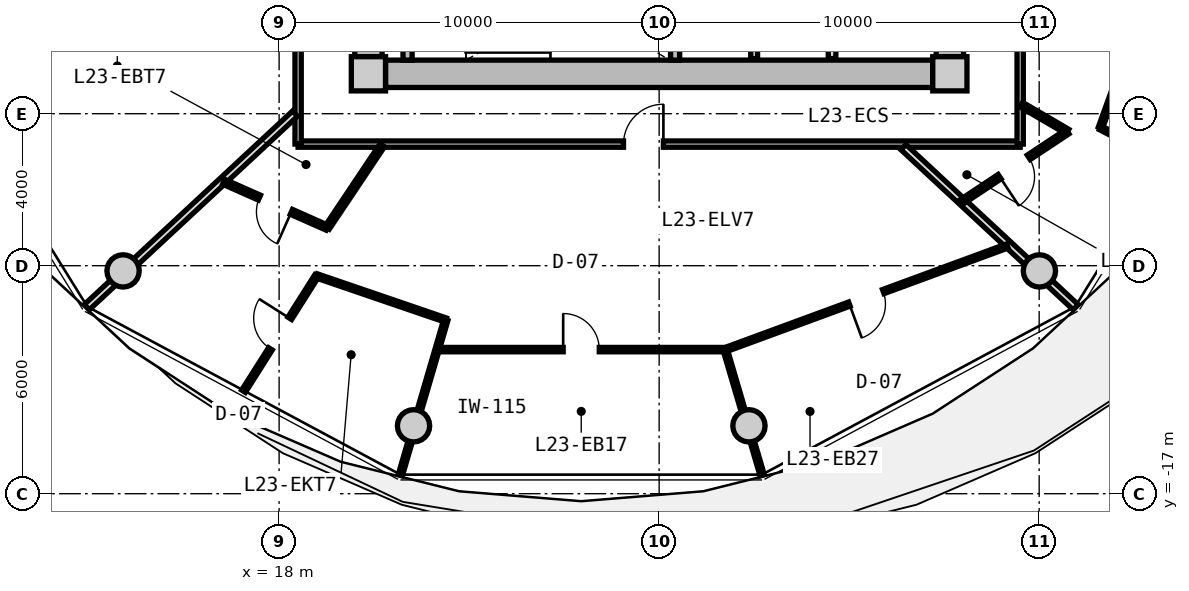
"""IFC4 building model, lengths in metres.
Left out: names, types, materials, properties, quantities, classifications, styles, units other than length and angle.
Written with IfcOpenShell. Run it as: python <this file> out.ifc"""

import sys

from ifc_helpers import new_model, si_unit, direction, frame, frame_2d, origin, origin_2d, place, context, subcontext, project, spatial, rectangle, circle, extrude, source, transform, mapped, element, fill, save


model = new_model("IFC4")
c1 = context("Model", 3, precision=1e-05, world=origin(), true_north=direction((0.0, 1.0)))
c2 = subcontext(c1, "Body", "Model", "MODEL_VIEW")
j1 = project(units=[si_unit("LENGTHUNIT", "METRE"), si_unit("PLANEANGLEUNIT", "RADIAN")], contexts=[c1])
p1 = place(None, origin())
s1 = spatial("IfcSite", under=j1, at=p1, CompositionType="ELEMENT")
p2 = place(p1, origin())
s2 = spatial("IfcBuilding", under=s1, at=p2, CompositionType="ELEMENT")
p3 = place(p2, frame((0.0, 0.0, 77.95)))
s3 = spatial("IfcBuildingStorey", under=s2, at=p3, CompositionType="ELEMENT", Elevation=77.95)
m1 = source(origin(), c2, "Body", "SweptSolid", [
    extrude(rectangle(XDim=0.9, YDim=0.9, at=origin_2d()), origin(), (0.0, 0.0, 1.0), 3.05),
])
for number, where, z_axis, x_axis in (
    (1, (20.35, -5.95, 0.0), (0.0, 0.0, 1.0), (1.0, 0.0, 0.0)),
    (2, (35.65, -5.95, 0.0), (0.0, 0.0, 1.0), (1.0, 0.0, 0.0)),
):
    element("IfcColumn", number, at=place(p3, frame(where, z_axis=z_axis, x_axis=x_axis)), inside=s3, PredefinedType="COLUMN", context=c2, shape_type="MappedRepresentation", body=[
        mapped(m1, transform((0.0, 0.0, 0.0), x_axis=(1.0, 0.0, 0.0), y_axis=(0.0, 1.0, 0.0), z_axis=(0.0, 0.0, 1.0), scale=1.0)),
    ])
m2 = source(origin(), c2, "Body", "SweptSolid", [
    extrude(rectangle(XDim=14.4, YDim=0.72, at=frame_2d((7.2, 0.0))), origin(), (0.0, 0.0, 1.0), 2.79),
])
p4 = place(p3, frame((35.2, -5.95, 0.0), z_axis=(0.0, 0.0, 1.0), x_axis=(-1.0, 0.0, 0.0)))
e3 = element("IfcWall", 3, at=p4, inside=s3, PredefinedType="SHEAR", context=c2, shape_type="MappedRepresentation", body=[
    mapped(m2, transform((0.0, 0.0, 0.0), x_axis=(1.0, 0.0, 0.0), y_axis=(0.0, 1.0, 0.0), z_axis=(0.0, 0.0, 1.0), scale=1.0)),
])
m3 = source(origin(), c2, "Body", "SweptSolid", [
    extrude(rectangle(XDim=11.0, YDim=0.72, at=frame_2d((5.5, 0.0))), origin(), (0.0, 0.0, 1.0), 2.79),
])
p5 = place(p3, frame((20.35, -5.5, 0.0), z_axis=(0.0, 0.0, 1.0), x_axis=(0.0, 1.0, 0.0)))
e4 = element("IfcWall", 4, at=p5, inside=s3, PredefinedType="SHEAR", context=c2, shape_type="MappedRepresentation", body=[
    mapped(m3, transform((0.0, 0.0, 0.0), x_axis=(1.0, 0.0, 0.0), y_axis=(0.0, 1.0, 0.0), z_axis=(0.0, 0.0, 1.0), scale=1.0)),
])
p6 = place(p5, frame((3.8, 0.0, 0.0)))
e5 = element("IfcOpeningElement", 5, at=p6, cuts=e4, PredefinedType="OPENING", context=c2, shape_type="SweptSolid", body=[
    extrude(rectangle(XDim=1.2, YDim=2.15, at=frame_2d((0.6, 1.075))), frame((0.0, 0.37, 0.0), z_axis=(0.0, -1.0, 0.0), x_axis=(1.0, 0.0, 0.0)), (0.0, 0.0, 1.0), 0.74),
])
p7 = place(p3, frame((35.65, 5.5, 0.0), z_axis=(0.0, 0.0, 1.0), x_axis=(0.0, -1.0, 0.0)))
e6 = element("IfcWall", 6, at=p7, inside=s3, PredefinedType="SHEAR", context=c2, shape_type="MappedRepresentation", body=[
    mapped(m3, transform((0.0, 0.0, 0.0), x_axis=(1.0, 0.0, 0.0), y_axis=(0.0, 1.0, 0.0), z_axis=(0.0, 0.0, 1.0), scale=1.0)),
])
p8 = place(p7, frame((5.65, 0.0, 0.0)))
e7 = element("IfcOpeningElement", 7, at=p8, cuts=e6, PredefinedType="OPENING", context=c2, shape_type="SweptSolid", body=[
    extrude(rectangle(XDim=1.2, YDim=2.15, at=frame_2d((0.6, 1.075))), frame((0.0, 0.37, 0.0), z_axis=(0.0, -1.0, 0.0), x_axis=(1.0, 0.0, 0.0)), (0.0, 0.0, 1.0), 0.74),
])
p9 = place(p7, frame((9.3, 0.0, 0.0)))
e8 = element("IfcOpeningElement", 8, at=p9, cuts=e6, PredefinedType="OPENING", context=c2, shape_type="SweptSolid", body=[
    extrude(rectangle(XDim=1.0, YDim=2.1, at=frame_2d((0.5, 1.05))), frame((0.0, 0.37, 0.0), z_axis=(0.0, -1.0, 0.0), x_axis=(1.0, 0.0, 0.0)), (0.0, 0.0, 1.0), 0.74),
])
m4 = source(origin(), c2, "Body", "SweptSolid", [
    extrude(circle(Radius=0.425, at=origin_2d()), origin(), (0.0, 0.0, 1.0), 3.47),
])
for number, where, z_axis, x_axis in (
    (9, (13.894, -11.137, -0.42), (0.0, 0.0, 1.0), (1.0, 0.0, 0.0)),
    (10, (21.537, -15.213, -0.42), (0.0, 0.0, 1.0), (1.0, 0.0, 0.0)),
    (11, (30.363, -15.213, -0.42), (0.0, 0.0, 1.0), (1.0, 0.0, 0.0)),
    (12, (38.006, -11.137, -0.42), (0.0, 0.0, 1.0), (1.0, 0.0, 0.0)),
):
    element("IfcColumn", number, at=place(p3, frame(where, z_axis=z_axis, x_axis=x_axis)), inside=s3, PredefinedType="COLUMN", context=c2, shape_type="MappedRepresentation", body=[
        mapped(m4, transform((0.0, 0.0, 0.0), x_axis=(1.0, 0.0, 0.0), y_axis=(0.0, 1.0, 0.0), z_axis=(0.0, 0.0, 1.0), scale=1.0)),
    ])
m5 = source(origin(), c2, "Body", "SweptSolid", [
    extrude(rectangle(XDim=3.14, YDim=0.24, at=frame_2d((1.57, 0.0))), origin(), (0.0, 0.0, 1.0), 2.79),
])
for number, where, z_axis, x_axis in (
    (13, (21.38, -5.59, 0.0), (0.0, 0.0, 1.0), (0.0, 1.0, 0.0)),
    (14, (28.42, -5.59, 0.0), (0.0, 0.0, 1.0), (0.0, 1.0, 0.0)),
):
    element("IfcWall", number, at=place(p3, frame(where, z_axis=z_axis, x_axis=x_axis)), inside=s3, PredefinedType="PARTITIONING", context=c2, shape_type="MappedRepresentation", body=[
        mapped(m5, transform((0.0, 0.0, 0.0), x_axis=(1.0, 0.0, 0.0), y_axis=(0.0, 1.0, 0.0), z_axis=(0.0, 0.0, 1.0), scale=1.0)),
    ])
m6 = source(origin(), c2, "Body", "SweptSolid", [
    extrude(rectangle(XDim=3.8, YDim=0.2, at=frame_2d((1.9, 0.0))), origin(), (0.0, 0.0, 1.0), 2.775),
])
p10 = place(p3, frame((32.55, -5.55, 0.0), z_axis=(0.0, 0.0, 1.0), x_axis=(0.0, 1.0, 0.0)))
e15 = element("IfcWall", 15, at=p10, inside=s3, PredefinedType="PARTITIONING", context=c2, shape_type="MappedRepresentation", body=[
    mapped(m6, transform((0.0, 0.0, 0.0), x_axis=(1.0, 0.0, 0.0), y_axis=(0.0, 1.0, 0.0), z_axis=(0.0, 0.0, 1.0), scale=1.0)),
])
m7 = source(origin(), c2, "Body", "SweptSolid", [
    extrude(rectangle(XDim=3.22, YDim=0.18, at=frame_2d((1.61, 0.0))), origin(), (0.0, 0.0, 1.0), 2.775),
])
p11 = place(p3, frame((30.5, -5.55, 0.0), z_axis=(0.0, 0.0, 1.0), x_axis=(0.0, 1.0, 0.0)))
e16 = element("IfcWall", 16, at=p11, inside=s3, PredefinedType="PARTITIONING", context=c2, shape_type="MappedRepresentation", body=[
    mapped(m7, transform((0.0, 0.0, 0.0), x_axis=(1.0, 0.0, 0.0), y_axis=(0.0, 1.0, 0.0), z_axis=(0.0, 0.0, 1.0), scale=1.0)),
])
m8 = source(origin(), c2, "Body", "SweptSolid", [
    extrude(rectangle(XDim=19.0, YDim=0.165, at=frame_2d((9.5, 0.0))), origin(), (0.0, 0.0, 1.0), 2.775),
])
p12 = place(p3, frame((37.5, -7.8, 0.0), z_axis=(0.0, 0.0, 1.0), x_axis=(-1.0, 0.0, 0.0)))
e17 = element("IfcWall", 17, at=p12, inside=s3, PredefinedType="PARTITIONING", context=c2, shape_type="MappedRepresentation", body=[
    mapped(m8, transform((0.0, 0.0, 0.0), x_axis=(1.0, 0.0, 0.0), y_axis=(0.0, 1.0, 0.0), z_axis=(0.0, 0.0, 1.0), scale=1.0)),
])
p13 = place(p12, frame((9.388, 0.0, 0.0)))
e18 = element("IfcOpeningElement", 18, at=p13, cuts=e17, PredefinedType="OPENING", context=c2, shape_type="SweptSolid", body=[
    extrude(rectangle(XDim=1.05, YDim=2.15, at=frame_2d((0.525, 1.075))), frame((0.0, 0.093, 0.0), z_axis=(0.0, -1.0, 0.0), x_axis=(1.0, 0.0, 0.0)), (0.0, 0.0, 1.0), 0.185),
])
m9 = source(origin(), c2, "Body", "SweptSolid", [
    extrude(rectangle(XDim=15.6, YDim=0.165, at=frame_2d((7.8, 0.0))), origin(), (0.0, 0.0, 1.0), 2.775),
])
p14 = place(p3, frame((18.5, -7.8, 0.0), z_axis=(0.0, 0.0, 1.0), x_axis=(0.0, 1.0, 0.0)))
e19 = element("IfcWall", 19, at=p14, inside=s3, PredefinedType="PARTITIONING", context=c2, shape_type="MappedRepresentation", body=[
    mapped(m9, transform((0.0, 0.0, 0.0), x_axis=(1.0, 0.0, 0.0), y_axis=(0.0, 1.0, 0.0), z_axis=(0.0, 0.0, 1.0), scale=1.0)),
])
p15 = place(p14, frame((13.304, 0.0, 0.0)))
e20 = element("IfcOpeningElement", 20, at=p15, cuts=e19, PredefinedType="OPENING", context=c2, shape_type="SweptSolid", body=[
    extrude(rectangle(XDim=0.92, YDim=2.1, at=frame_2d((0.46, 1.05))), frame((0.0, 0.093, 0.0), z_axis=(0.0, -1.0, 0.0), x_axis=(1.0, 0.0, 0.0)), (0.0, 0.0, 1.0), 0.185),
])
p16 = place(p14, frame((10.69, 0.0, 0.0)))
e21 = element("IfcOpeningElement", 21, at=p16, cuts=e19, PredefinedType="OPENING", context=c2, shape_type="SweptSolid", body=[
    extrude(rectangle(XDim=0.92, YDim=2.1, at=frame_2d((0.46, 1.05))), frame((0.0, 0.093, 0.0), z_axis=(0.0, -1.0, 0.0), x_axis=(1.0, 0.0, 0.0)), (0.0, 0.0, 1.0), 0.185),
])
p17 = place(p14, frame((7.175, 0.0, 0.0)))
e22 = element("IfcOpeningElement", 22, at=p17, cuts=e19, PredefinedType="OPENING", context=c2, shape_type="SweptSolid", body=[
    extrude(rectangle(XDim=1.25, YDim=2.2, at=frame_2d((0.625, 1.1))), frame((0.0, 0.093, 0.0), z_axis=(0.0, -1.0, 0.0), x_axis=(1.0, 0.0, 0.0)), (0.0, 0.0, 1.0), 0.185),
])
p18 = place(p14, frame((2.686, 0.0, 0.0)))
e23 = element("IfcOpeningElement", 23, at=p18, cuts=e19, PredefinedType="OPENING", context=c2, shape_type="SweptSolid", body=[
    extrude(rectangle(XDim=1.25, YDim=2.2, at=frame_2d((0.625, 1.1))), frame((0.0, 0.093, 0.0), z_axis=(0.0, -1.0, 0.0), x_axis=(1.0, 0.0, 0.0)), (0.0, 0.0, 1.0), 0.185),
])
p19 = place(p3, frame((37.5, 7.8, 0.0), z_axis=(0.0, 0.0, 1.0), x_axis=(0.0, -1.0, 0.0)))
e24 = element("IfcWall", 24, at=p19, inside=s3, PredefinedType="PARTITIONING", context=c2, shape_type="MappedRepresentation", body=[
    mapped(m9, transform((0.0, 0.0, 0.0), x_axis=(1.0, 0.0, 0.0), y_axis=(0.0, 1.0, 0.0), z_axis=(0.0, 0.0, 1.0), scale=1.0)),
])
p20 = place(p19, frame((6.87, 0.0, 0.0)))
e25 = element("IfcOpeningElement", 25, at=p20, cuts=e24, PredefinedType="OPENING", context=c2, shape_type="SweptSolid", body=[
    extrude(rectangle(XDim=1.05, YDim=2.15, at=frame_2d((0.525, 1.075))), frame((0.0, 0.093, 0.0), z_axis=(0.0, -1.0, 0.0), x_axis=(1.0, 0.0, 0.0)), (0.0, 0.0, 1.0), 0.185),
])
m10 = source(origin(), c2, "Body", "SweptSolid", [
    extrude(rectangle(XDim=7.482, YDim=0.19, at=frame_2d((3.741, 0.0))), origin(), (0.0, 0.0, 1.0), 2.275),
])
p21 = place(p3, frame((18.42, -6.998, 0.0), z_axis=(0.0, 0.0, 1.0), x_axis=(-0.732508698043, -0.680757671489, 0.0)))
e26 = element("IfcWall", 26, at=p21, inside=s3, PredefinedType="PARTITIONING", context=c2, shape_type="MappedRepresentation", body=[
    mapped(m10, transform((0.0, 0.0, 0.0), x_axis=(1.0, 0.0, 0.0), y_axis=(0.0, 1.0, 0.0), z_axis=(0.0, 0.0, 1.0), scale=1.0)),
])
m11 = source(origin(), c2, "Body", "SweptSolid", [
    extrude(rectangle(XDim=6.187, YDim=0.19, at=frame_2d((3.093, 0.0))), origin(), (0.0, 0.0, 1.0), 2.275),
])
p22 = place(p3, frame((34.429, -7.88, 0.0), z_axis=(0.0, 0.0, 1.0), x_axis=(0.732501077882, -0.680765870841, 0.0)))
e27 = element("IfcWall", 27, at=p22, inside=s3, PredefinedType="PARTITIONING", context=c2, shape_type="MappedRepresentation", body=[
    mapped(m11, transform((0.0, 0.0, 0.0), x_axis=(1.0, 0.0, 0.0), y_axis=(0.0, 1.0, 0.0), z_axis=(0.0, 0.0, 1.0), scale=1.0)),
])
m12 = source(origin(), c2, "Body", "SweptSolid", [
    extrude(rectangle(XDim=7.575, YDim=0.115, at=frame_2d((3.787, 0.0))), origin(), (0.0, 0.0, 1.0), 2.775),
])
p23 = place(p3, frame((22.163, -13.208, 0.0), z_axis=(0.0, 0.0, 1.0), x_axis=(1.0, 0.0, 0.0)))
e28 = element("IfcWall", 28, at=p23, inside=s3, PredefinedType="PARTITIONING", context=c2, shape_type="MappedRepresentation", body=[
    mapped(m12, transform((0.0, 0.0, 0.0), x_axis=(1.0, 0.0, 0.0), y_axis=(0.0, 1.0, 0.0), z_axis=(0.0, 0.0, 1.0), scale=1.0)),
])
p24 = place(p23, frame((3.312, 0.0, 0.0)))
e29 = element("IfcOpeningElement", 29, at=p24, cuts=e28, PredefinedType="OPENING", context=c2, shape_type="SweptSolid", body=[
    extrude(rectangle(XDim=0.95, YDim=2.1, at=frame_2d((0.475, 1.05))), frame((0.0, 0.067, 0.0), z_axis=(0.0, -1.0, 0.0), x_axis=(1.0, 0.0, 0.0)), (0.0, 0.0, 1.0), 0.135),
])
m13 = source(origin(), c2, "Body", "SweptSolid", [
    extrude(rectangle(XDim=4.262, YDim=0.115, at=frame_2d((2.131, 0.0))), origin(), (0.0, 0.0, 1.0), 2.275),
])
p25 = place(p3, frame((22.386, -12.427, 0.0), z_axis=(0.0, 0.0, 1.0), x_axis=(-0.281266797169, -0.95962961022, 0.0)))
e30 = element("IfcWall", 30, at=p25, inside=s3, PredefinedType="PARTITIONING", context=c2, shape_type="MappedRepresentation", body=[
    mapped(m13, transform((0.0, 0.0, 0.0), x_axis=(1.0, 0.0, 0.0), y_axis=(0.0, 1.0, 0.0), z_axis=(0.0, 0.0, 1.0), scale=1.0)),
])
m14 = source(origin(), c2, "Body", "SweptSolid", [
    extrude(rectangle(XDim=7.913, YDim=0.115, at=frame_2d((3.956, 0.0))), origin(), (0.0, 0.0, 1.0), 2.775),
])
p26 = place(p3, frame((29.738, -13.212, 0.0), z_axis=(0.0, 0.0, 1.0), x_axis=(0.938495791702, 0.345290673141, 0.0)))
e31 = element("IfcWall", 31, at=p26, inside=s3, PredefinedType="PARTITIONING", context=c2, shape_type="MappedRepresentation", body=[
    mapped(m14, transform((0.0, 0.0, 0.0), x_axis=(1.0, 0.0, 0.0), y_axis=(0.0, 1.0, 0.0), z_axis=(0.0, 0.0, 1.0), scale=1.0)),
])
p27 = place(p26, frame((3.481, 0.0, 0.0)))
e32 = element("IfcOpeningElement", 32, at=p27, cuts=e31, PredefinedType="OPENING", context=c2, shape_type="SweptSolid", body=[
    extrude(rectangle(XDim=0.95, YDim=2.1, at=frame_2d((0.475, 1.05))), frame((0.0, 0.067, 0.0), z_axis=(0.0, -1.0, 0.0), x_axis=(1.0, 0.0, 0.0)), (0.0, 0.0, 1.0), 0.135),
])
m15 = source(origin(), c2, "Body", "SweptSolid", [
    extrude(rectangle(XDim=3.446, YDim=0.115, at=frame_2d((1.723, 0.0))), origin(), (0.0, 0.0, 1.0), 2.275),
])
p28 = place(p3, frame((29.738, -13.212, 0.0), z_axis=(0.0, 0.0, 1.0), x_axis=(0.282599711651, -0.95923792824, 0.0)))
e33 = element("IfcWall", 33, at=p28, inside=s3, PredefinedType="PARTITIONING", context=c2, shape_type="MappedRepresentation", body=[
    mapped(m15, transform((0.0, 0.0, 0.0), x_axis=(1.0, 0.0, 0.0), y_axis=(0.0, 1.0, 0.0), z_axis=(0.0, 0.0, 1.0), scale=1.0)),
])
m16 = source(origin(), c2, "Body", "SweptSolid", [
    extrude(rectangle(XDim=2.61, YDim=0.14, at=frame_2d((1.305, 0.0))), origin(), (0.0, 0.0, 1.0), 2.775),
])
p29 = place(p3, frame((20.714, -7.83, 0.0), z_axis=(0.0, 0.0, 1.0), x_axis=(-0.55584360516, -0.83128688586, 0.0)))
e34 = element("IfcWall", 34, at=p29, inside=s3, PredefinedType="PARTITIONING", context=c2, shape_type="MappedRepresentation", body=[
    mapped(m16, transform((0.0, 0.0, 0.0), x_axis=(1.0, 0.0, 0.0), y_axis=(0.0, 1.0, 0.0), z_axis=(0.0, 0.0, 1.0), scale=1.0)),
])
m17 = source(origin(), c2, "Body", "SweptSolid", [
    extrude(rectangle(XDim=2.978, YDim=0.14, at=frame_2d((1.489, 0.0))), origin(), (0.0, 0.0, 1.0), 2.775),
])
p30 = place(p3, frame((19.263, -10.0, 0.0), z_axis=(0.0, 0.0, 1.0), x_axis=(-0.913970391966, 0.405780880043, 0.0)))
e35 = element("IfcWall", 35, at=p30, inside=s3, PredefinedType="PARTITIONING", context=c2, shape_type="MappedRepresentation", body=[
    mapped(m17, transform((0.0, 0.0, 0.0), x_axis=(1.0, 0.0, 0.0), y_axis=(0.0, 1.0, 0.0), z_axis=(0.0, 0.0, 1.0), scale=1.0)),
])
p31 = place(p30, frame((1.029, 0.0, 0.0)))
e36 = element("IfcOpeningElement", 36, at=p31, cuts=e35, PredefinedType="OPENING", context=c2, shape_type="SweptSolid", body=[
    extrude(rectangle(XDim=0.92, YDim=2.1, at=frame_2d((0.46, 1.05))), frame((0.0, 0.08, 0.0), z_axis=(0.0, -1.0, 0.0), x_axis=(1.0, 0.0, 0.0)), (0.0, 0.0, 1.0), 0.16),
])
m18 = source(origin(), c2, "Body", "SweptSolid", [
    extrude(rectangle(XDim=3.595, YDim=0.115, at=frame_2d((1.797, 0.0))), origin(), (0.0, 0.0, 1.0), 2.775),
])
p32 = place(p3, frame((18.988, -11.268, 0.0), z_axis=(0.0, 0.0, 1.0), x_axis=(-0.535384889205, -0.844608205271, 0.0)))
e37 = element("IfcWall", 37, at=p32, inside=s3, PredefinedType="PARTITIONING", context=c2, shape_type="MappedRepresentation", body=[
    mapped(m18, transform((0.0, 0.0, 0.0), x_axis=(1.0, 0.0, 0.0), y_axis=(0.0, 1.0, 0.0), z_axis=(0.0, 0.0, 1.0), scale=1.0)),
])
p33 = place(p32, frame((1.323, 0.0, 0.0)))
e38 = element("IfcOpeningElement", 38, at=p33, cuts=e37, PredefinedType="OPENING", context=c2, shape_type="SweptSolid", body=[
    extrude(rectangle(XDim=0.95, YDim=2.1, at=frame_2d((0.475, 1.05))), frame((0.0, 0.067, 0.0), z_axis=(0.0, -1.0, 0.0), x_axis=(1.0, 0.0, 0.0)), (0.0, 0.0, 1.0), 0.135),
])
m19 = source(origin(), c2, "Body", "SweptSolid", [
    extrude(rectangle(XDim=3.591, YDim=0.115, at=frame_2d((1.795, 0.0))), origin(), (0.0, 0.0, 1.0), 2.775),
])
p34 = place(p3, frame((18.988, -11.268, 0.0), z_axis=(0.0, 0.0, 1.0), x_axis=(0.946165628752, -0.323682874074, 0.0)))
e39 = element("IfcWall", 39, at=p34, inside=s3, PredefinedType="PARTITIONING", context=c2, shape_type="MappedRepresentation", body=[
    mapped(m19, transform((0.0, 0.0, 0.0), x_axis=(1.0, 0.0, 0.0), y_axis=(0.0, 1.0, 0.0), z_axis=(0.0, 0.0, 1.0), scale=1.0)),
])
m20 = source(origin(), c2, "Body", "SweptSolid", [
    extrude(rectangle(XDim=1.407, YDim=0.14, at=frame_2d((0.704, 0.0))), origin(), (0.0, 0.0, 1.0), 2.775),
])
p35 = place(p3, frame((37.53, -6.762, 0.0), z_axis=(0.0, 0.0, 1.0), x_axis=(0.863539718977, -0.504280828258, 0.0)))
e40 = element("IfcWall", 40, at=p35, inside=s3, PredefinedType="PARTITIONING", context=c2, shape_type="MappedRepresentation", body=[
    mapped(m20, transform((0.0, 0.0, 0.0), x_axis=(1.0, 0.0, 0.0), y_axis=(0.0, 1.0, 0.0), z_axis=(0.0, 0.0, 1.0), scale=1.0)),
])
m21 = source(origin(), c2, "Body", "SweptSolid", [
    extrude(rectangle(XDim=3.368, YDim=0.14, at=frame_2d((1.684, 0.0))), origin(), (0.0, 0.0, 1.0), 2.775),
])
p36 = place(p3, frame((38.745, -7.472, 0.0), z_axis=(0.0, 0.0, 1.0), x_axis=(-0.83321925645, -0.552942737253, 0.0)))
e41 = element("IfcWall", 41, at=p36, inside=s3, PredefinedType="PARTITIONING", context=c2, shape_type="MappedRepresentation", body=[
    mapped(m21, transform((0.0, 0.0, 0.0), x_axis=(1.0, 0.0, 0.0), y_axis=(0.0, 1.0, 0.0), z_axis=(0.0, 0.0, 1.0), scale=1.0)),
])
p37 = place(p36, frame((1.224, 0.0, 0.0)))
e42 = element("IfcOpeningElement", 42, at=p37, cuts=e41, PredefinedType="OPENING", context=c2, shape_type="SweptSolid", body=[
    extrude(rectangle(XDim=0.92, YDim=2.1, at=frame_2d((0.46, 1.05))), frame((0.0, 0.08, 0.0), z_axis=(0.0, -1.0, 0.0), x_axis=(1.0, 0.0, 0.0)), (0.0, 0.0, 1.0), 0.16),
])
m22 = source(origin(), c2, "Body", "SweptSolid", [
    extrude(rectangle(XDim=1.945, YDim=0.115, at=frame_2d((0.973, 0.0))), origin(), (0.0, 0.0, 1.0), 2.775),
])
p38 = place(p3, frame((39.611, -7.37, 0.0), z_axis=(0.0, 0.0, 1.0), x_axis=(0.889684148329, -0.456576517368, 0.0)))
e43 = element("IfcWall", 43, at=p38, inside=s3, PredefinedType="PARTITIONING", context=c2, shape_type="MappedRepresentation", body=[
    mapped(m22, transform((0.0, 0.0, 0.0), x_axis=(1.0, 0.0, 0.0), y_axis=(0.0, 1.0, 0.0), z_axis=(0.0, 0.0, 1.0), scale=1.0)),
])
m23 = source(origin(), c2, "Body", "SweptSolid", [
    extrude(rectangle(XDim=3.852, YDim=0.115, at=frame_2d((1.926, 0.0))), origin(), (0.0, 0.0, 1.0), 2.775),
])
p39 = place(p3, frame((39.611, -7.37, 0.0), z_axis=(0.0, 0.0, 1.0), x_axis=(0.340653649518, 0.940188859257, 0.0)))
e44 = element("IfcWall", 44, at=p39, inside=s3, PredefinedType="PARTITIONING", context=c2, shape_type="MappedRepresentation", body=[
    mapped(m23, transform((0.0, 0.0, 0.0), x_axis=(1.0, 0.0, 0.0), y_axis=(0.0, 1.0, 0.0), z_axis=(0.0, 0.0, 1.0), scale=1.0)),
])
p40 = place(p39, frame((1.451, 0.0, 0.0)))
e45 = element("IfcOpeningElement", 45, at=p40, cuts=e44, PredefinedType="OPENING", context=c2, shape_type="SweptSolid", body=[
    extrude(rectangle(XDim=0.95, YDim=2.1, at=frame_2d((0.475, 1.05))), frame((0.0, 0.067, 0.0), z_axis=(0.0, -1.0, 0.0), x_axis=(1.0, 0.0, 0.0)), (0.0, 0.0, 1.0), 0.135),
])
m24 = source(origin(), c2, "Body", "SweptSolid", [
    extrude(rectangle(XDim=1.05, YDim=2.15, at=frame_2d((0.525, 1.075))), frame((0.0, 0.025, 0.0), z_axis=(0.0, -1.0, 0.0), x_axis=(1.0, 0.0, 0.0)), (0.0, 0.0, 1.0), 0.05),
])
p41 = place(p13, frame((1.05, 0.0, 0.0), z_axis=(0.0, 0.0, 1.0), x_axis=(-1.0, 0.0, 0.0)))
e46 = element("IfcDoor", 46, at=p41, inside=s3, OperationType="SINGLE_SWING_RIGHT", PredefinedType="DOOR", context=c2, shape_type="MappedRepresentation", body=[
    mapped(m24, transform((0.0, 0.0, 0.0), x_axis=(1.0, 0.0, 0.0), y_axis=(0.0, 1.0, 0.0), z_axis=(0.0, 0.0, 1.0), scale=1.0)),
])
fill(e18, e46)
m25 = source(origin(), c2, "Body", "SweptSolid", [
    extrude(rectangle(XDim=0.92, YDim=2.1, at=frame_2d((0.46, 1.05))), frame((0.0, 0.025, 0.0), z_axis=(0.0, -1.0, 0.0), x_axis=(1.0, 0.0, 0.0)), (0.0, 0.0, 1.0), 0.05),
])
p42 = place(p31, origin())
e47 = element("IfcDoor", 47, at=p42, inside=s3, OperationType="SINGLE_SWING_LEFT", PredefinedType="DOOR", context=c2, shape_type="MappedRepresentation", body=[
    mapped(m25, transform((0.0, 0.0, 0.0), x_axis=(1.0, 0.0, 0.0), y_axis=(0.0, 1.0, 0.0), z_axis=(0.0, 0.0, 1.0), scale=1.0)),
])
fill(e36, e47)
m26 = source(origin(), c2, "Body", "SweptSolid", [
    extrude(rectangle(XDim=0.95, YDim=2.1, at=frame_2d((0.475, 1.05))), frame((0.0, 0.025, 0.0), z_axis=(0.0, -1.0, 0.0), x_axis=(1.0, 0.0, 0.0)), (0.0, 0.0, 1.0), 0.05),
])
p43 = place(p33, frame((0.95, 0.0, 0.0), z_axis=(0.0, 0.0, 1.0), x_axis=(-1.0, 0.0, 0.0)))
e48 = element("IfcDoor", 48, at=p43, inside=s3, OperationType="SINGLE_SWING_RIGHT", PredefinedType="DOOR", context=c2, shape_type="MappedRepresentation", body=[
    mapped(m26, transform((0.0, 0.0, 0.0), x_axis=(1.0, 0.0, 0.0), y_axis=(0.0, 1.0, 0.0), z_axis=(0.0, 0.0, 1.0), scale=1.0)),
])
fill(e38, e48)
p44 = place(p24, origin())
e49 = element("IfcDoor", 49, at=p44, inside=s3, OperationType="SINGLE_SWING_LEFT", PredefinedType="DOOR", context=c2, shape_type="MappedRepresentation", body=[
    mapped(m26, transform((0.0, 0.0, 0.0), x_axis=(1.0, 0.0, 0.0), y_axis=(0.0, 1.0, 0.0), z_axis=(0.0, 0.0, 1.0), scale=1.0)),
])
fill(e29, e49)
p45 = place(p27, frame((0.95, 0.0, 0.0), z_axis=(0.0, 0.0, 1.0), x_axis=(-1.0, 0.0, 0.0)))
e50 = element("IfcDoor", 50, at=p45, inside=s3, OperationType="SINGLE_SWING_RIGHT", PredefinedType="DOOR", context=c2, shape_type="MappedRepresentation", body=[
    mapped(m26, transform((0.0, 0.0, 0.0), x_axis=(1.0, 0.0, 0.0), y_axis=(0.0, 1.0, 0.0), z_axis=(0.0, 0.0, 1.0), scale=1.0)),
])
fill(e32, e50)
p46 = place(p37, origin())
e51 = element("IfcDoor", 51, at=p46, inside=s3, OperationType="SINGLE_SWING_RIGHT", PredefinedType="DOOR", context=c2, shape_type="MappedRepresentation", body=[
    mapped(m25, transform((0.0, 0.0, 0.0), x_axis=(1.0, 0.0, 0.0), y_axis=(0.0, 1.0, 0.0), z_axis=(0.0, 0.0, 1.0), scale=1.0)),
])
fill(e42, e51)
save(model, sys.argv[1])
